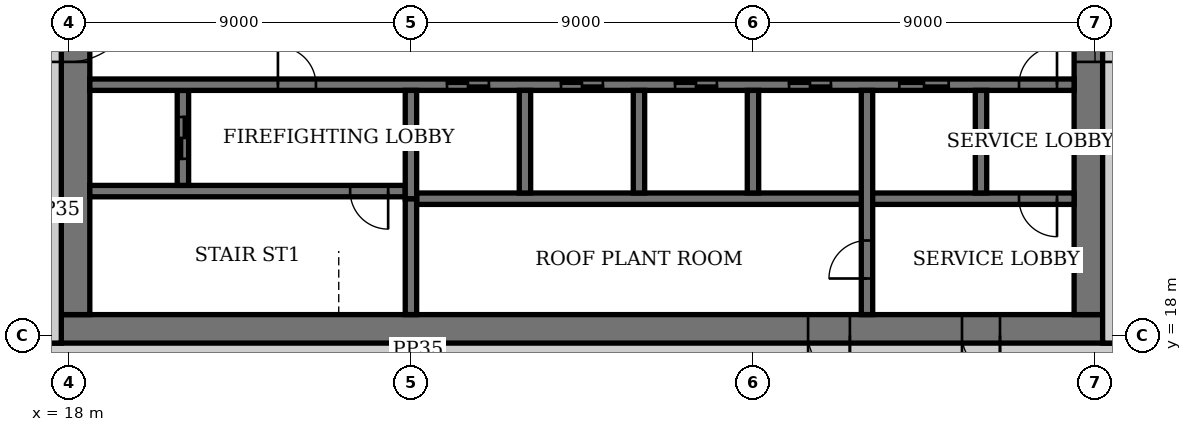
"""IFC4 building model, lengths in metres.
Left out: names, types, materials, properties, quantities, classifications, styles, units other than length and angle.
Written with IfcOpenShell. Run it as: python <this file> out.ifc"""

import sys

from ifc_helpers import new_model, si_unit, direction, frame, frame_2d, origin, place, context, subcontext, project, spatial, polyline, rectangle, outline, extrude, element, fill, save


model = new_model("IFC4")
c1 = context("Model", 3, precision=1e-05, world=origin(), true_north=direction((0.0, 1.0)))
c2 = subcontext(c1, "Body", "Model", "MODEL_VIEW")
j1 = project(units=[si_unit("LENGTHUNIT", "METRE"), si_unit("PLANEANGLEUNIT", "RADIAN")], contexts=[c1])
p1 = place(None, origin())
s1 = spatial("IfcSite", under=j1, at=p1, CompositionType="ELEMENT")
p2 = place(p1, origin())
s2 = spatial("IfcBuilding", under=s1, at=p2, CompositionType="ELEMENT")
p3 = place(p2, frame((0.0, 0.0, 311.8)))
s3 = spatial("IfcBuildingStorey", under=s2, at=p3, CompositionType="ELEMENT", Elevation=311.8)
p4 = place(p3, frame((17.45, 18.0, 0.0), z_axis=(0.0, 0.0, 1.0), x_axis=(1.0, 0.0, 0.0)))
e1 = element("IfcWall", 1, at=p4, inside=s3, PredefinedType="SHEAR", context=c2, shape_type="SweptSolid", body=[
    extrude(rectangle(XDim=28.1, YDim=1.1, at=frame_2d((14.05, 0.0))), origin(), (0.0, 0.0, 1.0), 6.0),
])
p5 = place(p4, frame((20.0, 0.0, 0.0)))
e2 = element("IfcOpeningElement", 2, at=p5, cuts=e1, PredefinedType="OPENING", context=c2, shape_type="SweptSolid", body=[
    extrude(rectangle(XDim=1.1, YDim=2.4, at=frame_2d((0.55, 1.2))), frame((0.0, 0.56, 0.0), z_axis=(0.0, -1.0, 0.0), x_axis=(1.0, 0.0, 0.0)), (0.0, 0.0, 1.0), 1.12),
])
p6 = place(p4, frame((24.05, 0.0, 0.0)))
e3 = element("IfcOpeningElement", 3, at=p6, cuts=e1, PredefinedType="OPENING", context=c2, shape_type="SweptSolid", body=[
    extrude(rectangle(XDim=1.0, YDim=2.4, at=frame_2d((0.5, 1.2))), frame((0.0, 0.56, 0.0), z_axis=(0.0, -1.0, 0.0), x_axis=(1.0, 0.0, 0.0)), (0.0, 0.0, 1.0), 1.12),
])
p7 = place(p3, frame((18.0, 35.45, 0.0), z_axis=(0.0, 0.0, 1.0), x_axis=(0.0, -1.0, 0.0)))
e4 = element("IfcWall", 4, at=p7, inside=s3, PredefinedType="SHEAR", context=c2, shape_type="SweptSolid", body=[
    extrude(rectangle(XDim=16.9, YDim=1.1, at=frame_2d((8.45, 0.0))), origin(), (0.0, 0.0, 1.0), 6.0),
])
p8 = place(p7, frame((8.45, 0.0, 0.0)))
e5 = element("IfcOpeningElement", 5, at=p8, cuts=e4, PredefinedType="OPENING", context=c2, shape_type="SweptSolid", body=[
    extrude(rectangle(XDim=1.8, YDim=2.4, at=frame_2d((0.9, 1.2))), frame((0.0, 0.56, 0.0), z_axis=(0.0, -1.0, 0.0), x_axis=(1.0, 0.0, 0.0)), (0.0, 0.0, 1.0), 1.12),
])
p9 = place(p7, frame((6.55, 0.0, 0.9)))
e6 = element("IfcOpeningElement", 6, at=p9, cuts=e4, PredefinedType="OPENING", context=c2, shape_type="SweptSolid", body=[
    extrude(rectangle(XDim=1.5, YDim=1.8, at=frame_2d((0.75, 0.9))), frame((0.0, 0.56, 0.0), z_axis=(0.0, -1.0, 0.0), x_axis=(1.0, 0.0, 0.0)), (0.0, 0.0, 1.0), 1.12),
])
p10 = place(p3, frame((45.0, 18.55, 0.0), z_axis=(0.0, 0.0, 1.0), x_axis=(0.0, 1.0, 0.0)))
e7 = element("IfcWall", 7, at=p10, inside=s3, PredefinedType="SHEAR", context=c2, shape_type="SweptSolid", body=[
    extrude(rectangle(XDim=16.9, YDim=1.1, at=frame_2d((8.45, 0.0))), origin(), (0.0, 0.0, 1.0), 6.0),
])
p11 = place(p10, frame((8.45, 0.0, 0.0)))
e8 = element("IfcOpeningElement", 8, at=p11, cuts=e7, PredefinedType="OPENING", context=c2, shape_type="SweptSolid", body=[
    extrude(rectangle(XDim=1.8, YDim=2.4, at=frame_2d((0.9, 1.2))), frame((0.0, 0.56, 0.0), z_axis=(0.0, -1.0, 0.0), x_axis=(1.0, 0.0, 0.0)), (0.0, 0.0, 1.0), 1.12),
])
p12 = place(p10, frame((6.65, 0.0, 0.9)))
e9 = element("IfcOpeningElement", 9, at=p12, cuts=e7, PredefinedType="OPENING", context=c2, shape_type="SweptSolid", body=[
    extrude(rectangle(XDim=1.5, YDim=1.8, at=frame_2d((0.75, 0.9))), frame((0.0, 0.56, 0.0), z_axis=(0.0, -1.0, 0.0), x_axis=(1.0, 0.0, 0.0)), (0.0, 0.0, 1.0), 1.12),
])
p13 = place(p3, frame((18.55, 21.8, 0.0), z_axis=(0.0, 0.0, 1.0), x_axis=(1.0, 0.0, 0.0)))
e10 = element("IfcWall", 10, at=p13, inside=s3, PredefinedType="SHEAR", context=c2, shape_type="SweptSolid", body=[
    extrude(rectangle(XDim=8.3, YDim=0.3, at=frame_2d((4.15, 0.0))), origin(), (0.0, 0.0, 1.0), 6.0),
])
p14 = place(p13, frame((6.85, 0.0, 0.0)))
e11 = element("IfcOpeningElement", 11, at=p14, cuts=e10, PredefinedType="OPENING", context=c2, shape_type="SweptSolid", body=[
    extrude(rectangle(XDim=1.0, YDim=2.4, at=frame_2d((0.5, 1.2))), frame((0.0, 0.16, 0.0), z_axis=(0.0, -1.0, 0.0), x_axis=(1.0, 0.0, 0.0)), (0.0, 0.0, 1.0), 0.32),
])
p15 = place(p3, frame((27.0, 18.55, 0.0), z_axis=(0.0, 0.0, 1.0), x_axis=(0.0, 1.0, 0.0)))
e12 = element("IfcWall", 12, at=p15, inside=s3, PredefinedType="SHEAR", context=c2, shape_type="SweptSolid", body=[
    extrude(rectangle(XDim=3.05, YDim=0.3, at=frame_2d((1.525, 0.0))), origin(), (0.0, 0.0, 1.0), 6.0),
])
p16 = place(p3, frame((21.0, 21.95, 0.0), z_axis=(0.0, 0.0, 1.0), x_axis=(0.0, 1.0, 0.0)))
e13 = element("IfcWall", 13, at=p16, inside=s3, PredefinedType="SHEAR", context=c2, shape_type="SweptSolid", body=[
    extrude(rectangle(XDim=2.5, YDim=0.3, at=frame_2d((1.25, 0.0))), origin(), (0.0, 0.0, 1.0), 6.0),
])
p17 = place(p16, frame((0.7, 0.0, 0.0)))
e14 = element("IfcOpeningElement", 14, at=p17, cuts=e13, PredefinedType="OPENING", context=c2, shape_type="SweptSolid", body=[
    extrude(rectangle(XDim=1.1, YDim=2.4, at=frame_2d((0.55, 1.2))), frame((0.0, 0.16, 0.0), z_axis=(0.0, -1.0, 0.0), x_axis=(1.0, 0.0, 0.0)), (0.0, 0.0, 1.0), 0.32),
])
p18 = place(p3, frame((18.55, 24.6, 0.0), z_axis=(0.0, 0.0, 1.0), x_axis=(1.0, 0.0, 0.0)))
e15 = element("IfcWall", 15, at=p18, inside=s3, PredefinedType="SHEAR", context=c2, shape_type="SweptSolid", body=[
    extrude(rectangle(XDim=25.9, YDim=0.3, at=frame_2d((12.95, 0.0))), origin(), (0.0, 0.0, 1.0), 6.0),
])
p19 = place(p18, frame((4.95, 0.0, 0.0)))
e16 = element("IfcOpeningElement", 16, at=p19, cuts=e15, PredefinedType="OPENING", context=c2, shape_type="SweptSolid", body=[
    extrude(rectangle(XDim=1.0, YDim=2.4, at=frame_2d((0.5, 1.2))), frame((0.0, 0.16, 0.0), z_axis=(0.0, -1.0, 0.0), x_axis=(1.0, 0.0, 0.0)), (0.0, 0.0, 1.0), 0.32),
])
p20 = place(p18, frame((24.45, 0.0, 0.0)))
e17 = element("IfcOpeningElement", 17, at=p20, cuts=e15, PredefinedType="OPENING", context=c2, shape_type="SweptSolid", body=[
    extrude(rectangle(XDim=1.0, YDim=2.4, at=frame_2d((0.5, 1.2))), frame((0.0, 0.16, 0.0), z_axis=(0.0, -1.0, 0.0), x_axis=(1.0, 0.0, 0.0)), (0.0, 0.0, 1.0), 0.32),
])
p21 = place(p18, frame((9.4, 0.0, 0.0)))
e18 = element("IfcOpeningElement", 18, at=p21, cuts=e15, PredefinedType="OPENING", context=c2, shape_type="SweptSolid", body=[
    extrude(rectangle(XDim=1.1, YDim=2.4, at=frame_2d((0.55, 1.2))), frame((0.0, 0.16, 0.0), z_axis=(0.0, -1.0, 0.0), x_axis=(1.0, 0.0, 0.0)), (0.0, 0.0, 1.0), 0.32),
])
p22 = place(p18, frame((12.4, 0.0, 0.0)))
e19 = element("IfcOpeningElement", 19, at=p22, cuts=e15, PredefinedType="OPENING", context=c2, shape_type="SweptSolid", body=[
    extrude(rectangle(XDim=1.1, YDim=2.4, at=frame_2d((0.55, 1.2))), frame((0.0, 0.16, 0.0), z_axis=(0.0, -1.0, 0.0), x_axis=(1.0, 0.0, 0.0)), (0.0, 0.0, 1.0), 0.32),
])
p23 = place(p18, frame((15.4, 0.0, 0.0)))
e20 = element("IfcOpeningElement", 20, at=p23, cuts=e15, PredefinedType="OPENING", context=c2, shape_type="SweptSolid", body=[
    extrude(rectangle(XDim=1.1, YDim=2.4, at=frame_2d((0.55, 1.2))), frame((0.0, 0.16, 0.0), z_axis=(0.0, -1.0, 0.0), x_axis=(1.0, 0.0, 0.0)), (0.0, 0.0, 1.0), 0.32),
])
p24 = place(p18, frame((18.4, 0.0, 0.0)))
e21 = element("IfcOpeningElement", 21, at=p24, cuts=e15, PredefinedType="OPENING", context=c2, shape_type="SweptSolid", body=[
    extrude(rectangle(XDim=1.1, YDim=2.4, at=frame_2d((0.55, 1.2))), frame((0.0, 0.16, 0.0), z_axis=(0.0, -1.0, 0.0), x_axis=(1.0, 0.0, 0.0)), (0.0, 0.0, 1.0), 0.32),
])
p25 = place(p18, frame((21.3, 0.0, 0.0)))
e22 = element("IfcOpeningElement", 22, at=p25, cuts=e15, PredefinedType="OPENING", context=c2, shape_type="SweptSolid", body=[
    extrude(rectangle(XDim=1.3, YDim=2.4, at=frame_2d((0.65, 1.2))), frame((0.0, 0.16, 0.0), z_axis=(0.0, -1.0, 0.0), x_axis=(1.0, 0.0, 0.0)), (0.0, 0.0, 1.0), 0.32),
])
p26 = place(p3, frame((27.15, 21.6, 0.0), z_axis=(0.0, 0.0, 1.0), x_axis=(1.0, 0.0, 0.0)))
e23 = element("IfcWall", 23, at=p26, inside=s3, PredefinedType="SHEAR", context=c2, shape_type="SweptSolid", body=[
    extrude(rectangle(XDim=17.3, YDim=0.3, at=frame_2d((8.65, 0.0))), origin(), (0.0, 0.0, 1.0), 6.0),
])
p27 = place(p26, frame((15.85, 0.0, 0.0)))
e24 = element("IfcOpeningElement", 24, at=p27, cuts=e23, PredefinedType="OPENING", context=c2, shape_type="SweptSolid", body=[
    extrude(rectangle(XDim=1.0, YDim=2.4, at=frame_2d((0.5, 1.2))), frame((0.0, 0.16, 0.0), z_axis=(0.0, -1.0, 0.0), x_axis=(1.0, 0.0, 0.0)), (0.0, 0.0, 1.0), 0.32),
])
for number, where, z_axis, x_axis in (
    (25, (30.0, 21.75, 0.0), (0.0, 0.0, 1.0), (0.0, 1.0, 0.0)),
    (26, (33.0, 21.75, 0.0), (0.0, 0.0, 1.0), (0.0, 1.0, 0.0)),
    (27, (36.0, 21.75, 0.0), (0.0, 0.0, 1.0), (0.0, 1.0, 0.0)),
):
    element("IfcWall", number, at=place(p3, frame(where, z_axis=z_axis, x_axis=x_axis)), inside=s3, PredefinedType="SHEAR", context=c2, shape_type="SweptSolid", body=[
        extrude(rectangle(XDim=2.7, YDim=0.3, at=frame_2d((1.35, 0.0))), origin(), (0.0, 0.0, 1.0), 6.0),
    ])
p28 = place(p3, frame((39.0, 18.55, 0.0), z_axis=(0.0, 0.0, 1.0), x_axis=(0.0, 1.0, 0.0)))
e28 = element("IfcWall", 28, at=p28, inside=s3, PredefinedType="SHEAR", context=c2, shape_type="SweptSolid", body=[
    extrude(rectangle(XDim=5.9, YDim=0.3, at=frame_2d((2.95, 0.0))), origin(), (0.0, 0.0, 1.0), 6.0),
])
p29 = place(p28, frame((0.95, 0.0, 0.0)))
e29 = element("IfcOpeningElement", 29, at=p29, cuts=e28, PredefinedType="OPENING", context=c2, shape_type="SweptSolid", body=[
    extrude(rectangle(XDim=1.0, YDim=2.4, at=frame_2d((0.5, 1.2))), frame((0.0, 0.16, 0.0), z_axis=(0.0, -1.0, 0.0), x_axis=(1.0, 0.0, 0.0)), (0.0, 0.0, 1.0), 0.32),
])
p30 = place(p3, frame((42.0, 21.75, 0.0), z_axis=(0.0, 0.0, 1.0), x_axis=(0.0, 1.0, 0.0)))
e30 = element("IfcWall", 30, at=p30, inside=s3, PredefinedType="SHEAR", context=c2, shape_type="SweptSolid", body=[
    extrude(rectangle(XDim=2.7, YDim=0.3, at=frame_2d((1.35, 0.0))), origin(), (0.0, 0.0, 1.0), 6.0),
])
p31 = place(p3, frame((27.0, 21.6, 0.0), z_axis=(0.0, 0.0, 1.0), x_axis=(0.0, 1.0, 0.0)))
e31 = element("IfcWall", 31, at=p31, inside=s3, PredefinedType="SHEAR", context=c2, shape_type="SweptSolid", body=[
    extrude(rectangle(XDim=2.85, YDim=0.3, at=frame_2d((1.425, 0.0))), origin(), (0.0, 0.0, 1.0), 6.0),
])
p32 = place(p3, frame((0.0, 0.0, 5.6)))
e32 = element("IfcWall", 32, at=p32, inside=s3, PredefinedType="PARAPET", context=c2, shape_type="SweptSolid", body=[
    extrude(outline(polyline([(45.0, 0.0), (46.175, 0.077), (47.329, 0.307), (48.444, 0.685), (49.5, 1.206), (50.479, 1.86), (51.364, 2.636), (52.14, 3.521), (52.794, 4.5), (53.315, 5.556), (53.693, 6.671), (53.923, 7.825), (54.0, 9.0), (54.0, 36.0), (53.923, 37.175), (53.693, 38.329), (53.315, 39.444), (52.794, 40.5), (52.14, 41.479), (51.364, 42.364), (50.479, 43.14), (49.5, 43.794), (48.444, 44.315), (47.329, 44.693), (46.175, 44.923), (45.0, 45.0), (18.0, 45.0), (16.825, 44.923), (15.671, 44.693), (14.556, 44.315), (13.5, 43.794), (12.521, 43.14), (11.636, 42.364), (10.86, 41.479), (10.206, 40.5), (9.685, 39.444), (9.307, 38.329), (9.077, 37.175), (9.0, 36.0), (9.0, 9.0), (9.077, 7.825), (9.307, 6.671), (9.685, 5.556), (10.206, 4.5), (10.86, 3.521), (11.636, 2.636), (12.521, 1.86), (13.5, 1.206), (14.556, 0.685), (15.671, 0.307), (16.825, 0.077), (18.0, 0.0), (45.0, 0.0)]), holes=[polyline([(44.989, 0.35), (18.011, 0.35), (16.871, 0.425), (15.761, 0.646), (14.69, 1.009), (13.675, 1.51), (12.735, 2.138), (11.884, 2.884), (11.138, 3.735), (10.51, 4.675), (10.009, 5.69), (9.646, 6.761), (9.425, 7.871), (9.35, 9.011), (9.35, 35.989), (9.425, 37.129), (9.646, 38.239), (10.009, 39.31), (10.51, 40.325), (11.138, 41.265), (11.884, 42.116), (12.735, 42.862), (13.675, 43.49), (14.69, 43.991), (15.761, 44.354), (16.871, 44.575), (18.011, 44.65), (44.989, 44.65), (46.129, 44.575), (47.239, 44.354), (48.31, 43.991), (49.325, 43.49), (50.265, 42.862), (51.116, 42.116), (51.862, 41.265), (52.49, 40.325), (52.991, 39.31), (53.354, 38.239), (53.575, 37.129), (53.65, 35.989), (53.65, 9.011), (53.575, 7.871), (53.354, 6.761), (52.991, 5.69), (52.49, 4.675), (51.862, 3.735), (51.116, 2.884), (50.265, 2.138), (49.325, 1.51), (48.31, 1.009), (47.239, 0.646), (46.129, 0.425), (44.989, 0.35)])]), origin(), (0.0, 0.0, 1.0), 0.6),
])
p33 = place(p8, origin())
e33 = element("IfcDoor", 33, at=p33, inside=s3, OperationType="DOUBLE_DOOR_DOUBLE_SWING", PredefinedType="DOOR", context=c2, shape_type="SweptSolid", body=[
    extrude(rectangle(XDim=1.8, YDim=2.4, at=frame_2d((0.9, 1.2))), frame((0.0, 0.03, 0.0), z_axis=(0.0, -1.0, 0.0), x_axis=(1.0, 0.0, 0.0)), (0.0, 0.0, 1.0), 0.06),
    extrude(rectangle(XDim=0.04, YDim=2.4, at=frame_2d((0.02, 1.2))), frame((0.0, 0.55, 0.0), z_axis=(0.0, -1.0, 0.0), x_axis=(1.0, 0.0, 0.0)), (0.0, 0.0, 1.0), 1.1),
    extrude(rectangle(XDim=0.04, YDim=2.4, at=frame_2d((1.78, 1.2))), frame((0.0, 0.55, 0.0), z_axis=(0.0, -1.0, 0.0), x_axis=(1.0, 0.0, 0.0)), (0.0, 0.0, 1.0), 1.1),
    extrude(rectangle(XDim=1.8, YDim=0.04, at=frame_2d((0.9, 2.38))), frame((0.0, 0.55, 0.0), z_axis=(0.0, -1.0, 0.0), x_axis=(1.0, 0.0, 0.0)), (0.0, 0.0, 1.0), 1.1),
])
fill(e5, e33)
p34 = place(p5, origin())
e34 = element("IfcDoor", 34, at=p34, inside=s3, OperationType="SINGLE_SWING_RIGHT", PredefinedType="DOOR", context=c2, shape_type="SweptSolid", body=[
    extrude(rectangle(XDim=1.1, YDim=2.4, at=frame_2d((0.55, 1.2))), frame((0.0, 0.025, 0.0), z_axis=(0.0, -1.0, 0.0), x_axis=(1.0, 0.0, 0.0)), (0.0, 0.0, 1.0), 0.05),
    extrude(rectangle(XDim=0.04, YDim=2.4, at=frame_2d((0.02, 1.2))), frame((0.0, 0.44, 0.0), z_axis=(0.0, -1.0, 0.0), x_axis=(1.0, 0.0, 0.0)), (0.0, 0.0, 1.0), 0.88),
    extrude(rectangle(XDim=0.04, YDim=2.4, at=frame_2d((1.08, 1.2))), frame((0.0, 0.44, 0.0), z_axis=(0.0, -1.0, 0.0), x_axis=(1.0, 0.0, 0.0)), (0.0, 0.0, 1.0), 0.88),
    extrude(rectangle(XDim=1.1, YDim=0.04, at=frame_2d((0.55, 2.38))), frame((0.0, 0.44, 0.0), z_axis=(0.0, -1.0, 0.0), x_axis=(1.0, 0.0, 0.0)), (0.0, 0.0, 1.0), 0.88),
])
fill(e2, e34)
p35 = place(p6, origin())
e35 = element("IfcDoor", 35, at=p35, inside=s3, OperationType="SINGLE_SWING_RIGHT", PredefinedType="DOOR", context=c2, shape_type="SweptSolid", body=[
    extrude(rectangle(XDim=1.0, YDim=2.4, at=frame_2d((0.5, 1.2))), frame((0.0, 0.025, 0.0), z_axis=(0.0, -1.0, 0.0), x_axis=(1.0, 0.0, 0.0)), (0.0, 0.0, 1.0), 0.05),
    extrude(rectangle(XDim=0.04, YDim=2.4, at=frame_2d((0.02, 1.2))), frame((0.0, 0.4, 0.0), z_axis=(0.0, -1.0, 0.0), x_axis=(1.0, 0.0, 0.0)), (0.0, 0.0, 1.0), 0.8),
    extrude(rectangle(XDim=0.04, YDim=2.4, at=frame_2d((0.98, 1.2))), frame((0.0, 0.4, 0.0), z_axis=(0.0, -1.0, 0.0), x_axis=(1.0, 0.0, 0.0)), (0.0, 0.0, 1.0), 0.8),
    extrude(rectangle(XDim=1.0, YDim=0.04, at=frame_2d((0.5, 2.38))), frame((0.0, 0.4, 0.0), z_axis=(0.0, -1.0, 0.0), x_axis=(1.0, 0.0, 0.0)), (0.0, 0.0, 1.0), 0.8),
])
fill(e3, e35)
p36 = place(p14, origin())
e36 = element("IfcDoor", 36, at=p36, inside=s3, OperationType="SINGLE_SWING_RIGHT", PredefinedType="DOOR", context=c2, shape_type="SweptSolid", body=[
    extrude(rectangle(XDim=1.0, YDim=2.4, at=frame_2d((0.5, 1.2))), frame((0.0, 0.03, 0.0), z_axis=(0.0, -1.0, 0.0), x_axis=(1.0, 0.0, 0.0)), (0.0, 0.0, 1.0), 0.06),
])
fill(e11, e36)
p37 = place(p19, origin())
e37 = element("IfcDoor", 37, at=p37, inside=s3, OperationType="SINGLE_SWING_RIGHT", PredefinedType="DOOR", context=c2, shape_type="SweptSolid", body=[
    extrude(rectangle(XDim=1.0, YDim=2.4, at=frame_2d((0.5, 1.2))), frame((0.0, 0.03, 0.0), z_axis=(0.0, -1.0, 0.0), x_axis=(1.0, 0.0, 0.0)), (0.0, 0.0, 1.0), 0.06),
])
fill(e16, e37)
p38 = place(p20, origin())
e38 = element("IfcDoor", 38, at=p38, inside=s3, OperationType="SINGLE_SWING_LEFT", PredefinedType="DOOR", context=c2, shape_type="SweptSolid", body=[
    extrude(rectangle(XDim=1.0, YDim=2.4, at=frame_2d((0.5, 1.2))), frame((0.0, 0.03, 0.0), z_axis=(0.0, -1.0, 0.0), x_axis=(1.0, 0.0, 0.0)), (0.0, 0.0, 1.0), 0.06),
])
fill(e17, e38)
p39 = place(p27, origin())
e39 = element("IfcDoor", 39, at=p39, inside=s3, OperationType="SINGLE_SWING_RIGHT", PredefinedType="DOOR", context=c2, shape_type="SweptSolid", body=[
    extrude(rectangle(XDim=1.0, YDim=2.4, at=frame_2d((0.5, 1.2))), frame((0.0, 0.03, 0.0), z_axis=(0.0, -1.0, 0.0), x_axis=(1.0, 0.0, 0.0)), (0.0, 0.0, 1.0), 0.06),
])
fill(e24, e39)
p40 = place(p29, origin())
e40 = element("IfcDoor", 40, at=p40, inside=s3, OperationType="SINGLE_SWING_RIGHT", PredefinedType="DOOR", context=c2, shape_type="SweptSolid", body=[
    extrude(rectangle(XDim=1.0, YDim=2.4, at=frame_2d((0.5, 1.2))), frame((0.0, 0.03, 0.0), z_axis=(0.0, -1.0, 0.0), x_axis=(1.0, 0.0, 0.0)), (0.0, 0.0, 1.0), 0.06),
])
fill(e29, e40)
p41 = place(p21, origin())
e41 = element("IfcDoor", 41, at=p41, inside=s3, OperationType="DOUBLE_DOOR_SLIDING", PredefinedType="DOOR", context=c2, shape_type="SweptSolid", body=[
    extrude(rectangle(XDim=1.1, YDim=2.4, at=frame_2d((0.55, 1.2))), frame((0.0, 0.02, 0.0), z_axis=(0.0, -1.0, 0.0), x_axis=(1.0, 0.0, 0.0)), (0.0, 0.0, 1.0), 0.04),
])
fill(e18, e41)
p42 = place(p22, origin())
e42 = element("IfcDoor", 42, at=p42, inside=s3, OperationType="DOUBLE_DOOR_SLIDING", PredefinedType="DOOR", context=c2, shape_type="SweptSolid", body=[
    extrude(rectangle(XDim=1.1, YDim=2.4, at=frame_2d((0.55, 1.2))), frame((0.0, 0.02, 0.0), z_axis=(0.0, -1.0, 0.0), x_axis=(1.0, 0.0, 0.0)), (0.0, 0.0, 1.0), 0.04),
])
fill(e19, e42)
p43 = place(p23, origin())
e43 = element("IfcDoor", 43, at=p43, inside=s3, OperationType="DOUBLE_DOOR_SLIDING", PredefinedType="DOOR", context=c2, shape_type="SweptSolid", body=[
    extrude(rectangle(XDim=1.1, YDim=2.4, at=frame_2d((0.55, 1.2))), frame((0.0, 0.02, 0.0), z_axis=(0.0, -1.0, 0.0), x_axis=(1.0, 0.0, 0.0)), (0.0, 0.0, 1.0), 0.04),
])
fill(e20, e43)
p44 = place(p24, origin())
e44 = element("IfcDoor", 44, at=p44, inside=s3, OperationType="DOUBLE_DOOR_SLIDING", PredefinedType="DOOR", context=c2, shape_type="SweptSolid", body=[
    extrude(rectangle(XDim=1.1, YDim=2.4, at=frame_2d((0.55, 1.2))), frame((0.0, 0.02, 0.0), z_axis=(0.0, -1.0, 0.0), x_axis=(1.0, 0.0, 0.0)), (0.0, 0.0, 1.0), 0.04),
])
fill(e21, e44)
p45 = place(p25, origin())
e45 = element("IfcDoor", 45, at=p45, inside=s3, OperationType="DOUBLE_DOOR_SLIDING", PredefinedType="DOOR", context=c2, shape_type="SweptSolid", body=[
    extrude(rectangle(XDim=1.3, YDim=2.4, at=frame_2d((0.65, 1.2))), frame((0.0, 0.02, 0.0), z_axis=(0.0, -1.0, 0.0), x_axis=(1.0, 0.0, 0.0)), (0.0, 0.0, 1.0), 0.04),
])
fill(e22, e45)
p46 = place(p17, origin())
e46 = element("IfcDoor", 46, at=p46, inside=s3, OperationType="DOUBLE_DOOR_SLIDING", PredefinedType="DOOR", context=c2, shape_type="SweptSolid", body=[
    extrude(rectangle(XDim=1.1, YDim=2.4, at=frame_2d((0.55, 1.2))), frame((0.0, 0.03, 0.0), z_axis=(0.0, -1.0, 0.0), x_axis=(1.0, 0.0, 0.0)), (0.0, 0.0, 1.0), 0.06),
])
fill(e14, e46)
p47 = place(p12, origin())
e47 = element("IfcWindow", 47, at=p47, inside=s3, PartitioningType="SINGLE_PANEL", PredefinedType="WINDOW", context=c2, shape_type="SweptSolid", body=[
    extrude(rectangle(XDim=1.5, YDim=1.8, at=frame_2d((0.75, 0.9))), frame((0.0, 0.03, 0.0), z_axis=(0.0, -1.0, 0.0), x_axis=(1.0, 0.0, 0.0)), (0.0, 0.0, 1.0), 0.06),
])
fill(e9, e47)
save(model, sys.argv[1])
